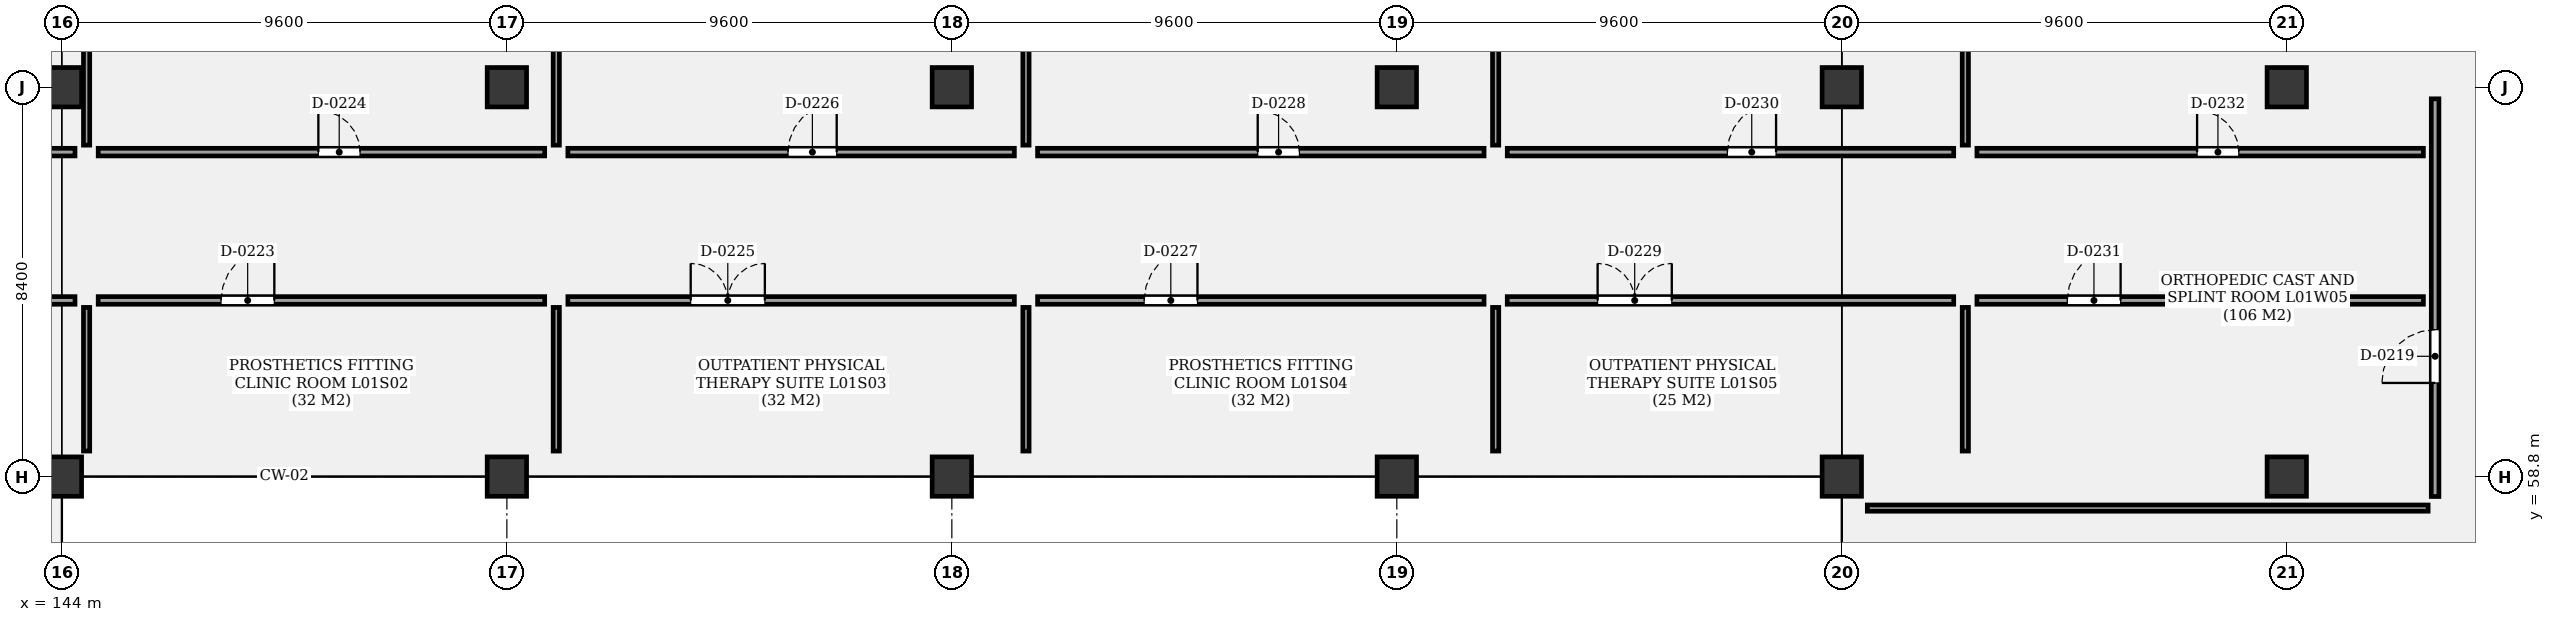
"""IFC4 building model, lengths in metres.
Left out: names, types, materials, properties, quantities, classifications, styles, units other than length and angle.
Written with IfcOpenShell. Run it as: python <this file> out.ifc"""

import sys

from ifc_helpers import new_model, si_unit, direction, frame, frame_2d, origin, origin_2d, place, context, subcontext, project, spatial, rectangle, extrude, element, fill, save


model = new_model("IFC4")
c1 = context("Model", 3, precision=1e-05, world=origin(), true_north=direction((0.0, 1.0)))
c2 = subcontext(c1, "Body", "Model", "MODEL_VIEW")
j1 = project(units=[si_unit("LENGTHUNIT", "METRE"), si_unit("PLANEANGLEUNIT", "RADIAN")], contexts=[c1])
p1 = place(None, origin())
s1 = spatial("IfcSite", under=j1, at=p1, CompositionType="ELEMENT")
p2 = place(p1, origin())
s2 = spatial("IfcBuilding", under=s1, at=p2, CompositionType="ELEMENT")
p3 = place(p2, frame((0.0, 0.0, 5.1)))
s3 = spatial("IfcBuildingStorey", under=s2, at=p3, CompositionType="ELEMENT", Elevation=5.1)
for number, where, z_axis, x_axis in (
    (1, (144.0, 58.8, 0.0), (0.0, 0.0, 1.0), (1.0, 0.0, 0.0)),
    (2, (144.0, 67.2, 0.0), (0.0, 0.0, 1.0), (1.0, 0.0, 0.0)),
    (3, (153.6, 58.8, 0.0), (0.0, 0.0, 1.0), (1.0, 0.0, 0.0)),
    (4, (153.6, 67.2, 0.0), (0.0, 0.0, 1.0), (1.0, 0.0, 0.0)),
    (5, (163.2, 58.8, 0.0), (0.0, 0.0, 1.0), (1.0, 0.0, 0.0)),
    (6, (163.2, 67.2, 0.0), (0.0, 0.0, 1.0), (1.0, 0.0, 0.0)),
    (7, (172.8, 58.8, 0.0), (0.0, 0.0, 1.0), (1.0, 0.0, 0.0)),
    (8, (172.8, 67.2, 0.0), (0.0, 0.0, 1.0), (1.0, 0.0, 0.0)),
    (9, (182.4, 58.8, 0.0), (0.0, 0.0, 1.0), (1.0, 0.0, 0.0)),
    (10, (182.4, 67.2, 0.0), (0.0, 0.0, 1.0), (1.0, 0.0, 0.0)),
    (11, (192.0, 58.8, 0.0), (0.0, 0.0, 1.0), (1.0, 0.0, 0.0)),
    (12, (192.0, 67.2, 0.0), (0.0, 0.0, 1.0), (1.0, 0.0, 0.0)),
):
    element("IfcColumn", number, at=place(p3, frame(where, z_axis=z_axis, x_axis=x_axis)), inside=s3, PredefinedType="COLUMN", context=c2, shape_type="SweptSolid", body=[
        extrude(rectangle(XDim=0.85, YDim=0.85, at=origin_2d()), origin(), (0.0, 0.0, 1.0), 4.8),
    ])
p4 = place(p3, frame((195.2, 58.37, 0.0), z_axis=(0.0, 0.0, 1.0), x_axis=(0.0, 1.0, 0.0)))
e13 = element("IfcWall", 13, at=p4, inside=s3, PredefinedType="PARTITIONING", context=c2, shape_type="SweptSolid", body=[
    extrude(rectangle(XDim=8.58, YDim=0.165, at=frame_2d((4.29, 0.0))), origin(), (0.0, 0.0, 1.0), 3.68),
])
p5 = place(p4, frame((2.45, 0.0, 0.0)))
e14 = element("IfcOpeningElement", 14, at=p5, cuts=e13, PredefinedType="OPENING", context=c2, shape_type="SweptSolid", body=[
    extrude(rectangle(XDim=1.15, YDim=2.2, at=frame_2d((0.575, 1.1))), frame((0.0, 0.093, 0.0), z_axis=(0.0, -1.0, 0.0), x_axis=(1.0, 0.0, 0.0)), (0.0, 0.0, 1.0), 0.185),
])
p6 = place(p3, frame((182.95, 58.12, 0.0), z_axis=(0.0, 0.0, 1.0), x_axis=(1.0, 0.0, 0.0)))
e15 = element("IfcWall", 15, at=p6, inside=s3, PredefinedType="PARTITIONING", context=c2, shape_type="SweptSolid", body=[
    extrude(rectangle(XDim=12.1, YDim=0.135, at=frame_2d((6.05, 0.0))), origin(), (0.0, 0.0, 1.0), 3.68),
])
p7 = place(p3, frame((134.65, 62.6, 0.0), z_axis=(0.0, 0.0, 1.0), x_axis=(1.0, 0.0, 0.0)))
e16 = element("IfcWall", 16, at=p7, inside=s3, PredefinedType="PARTITIONING", context=c2, shape_type="SweptSolid", body=[
    extrude(rectangle(XDim=9.633, YDim=0.165, at=frame_2d((4.816, 0.0))), origin(), (0.0, 0.0, 1.0), 3.68),
])
p8 = place(p7, frame((2.65, 0.0, 0.0)))
e17 = element("IfcOpeningElement", 17, at=p8, cuts=e16, PredefinedType="OPENING", context=c2, shape_type="SweptSolid", body=[
    extrude(rectangle(XDim=1.6, YDim=2.2, at=frame_2d((0.8, 1.1))), frame((0.0, 0.093, 0.0), z_axis=(0.0, -1.0, 0.0), x_axis=(1.0, 0.0, 0.0)), (0.0, 0.0, 1.0), 0.185),
])
p9 = place(p3, frame((134.65, 65.8, 0.0), z_axis=(0.0, 0.0, 1.0), x_axis=(1.0, 0.0, 0.0)))
e18 = element("IfcWall", 18, at=p9, inside=s3, PredefinedType="PARTITIONING", context=c2, shape_type="SweptSolid", body=[
    extrude(rectangle(XDim=9.633, YDim=0.165, at=frame_2d((4.816, 0.0))), origin(), (0.0, 0.0, 1.0), 3.68),
])
p10 = place(p9, frame((4.75, 0.0, 0.0)))
e19 = element("IfcOpeningElement", 19, at=p10, cuts=e18, PredefinedType="OPENING", context=c2, shape_type="SweptSolid", body=[
    extrude(rectangle(XDim=1.05, YDim=2.1, at=frame_2d((0.525, 1.05))), frame((0.0, 0.093, 0.0), z_axis=(0.0, -1.0, 0.0), x_axis=(1.0, 0.0, 0.0)), (0.0, 0.0, 1.0), 0.185),
])
p11 = place(p3, frame((144.783, 62.6, 0.0), z_axis=(0.0, 0.0, 1.0), x_axis=(1.0, 0.0, 0.0)))
e20 = element("IfcWall", 20, at=p11, inside=s3, PredefinedType="PARTITIONING", context=c2, shape_type="SweptSolid", body=[
    extrude(rectangle(XDim=9.633, YDim=0.165, at=frame_2d((4.816, 0.0))), origin(), (0.0, 0.0, 1.0), 3.68),
])
p12 = place(p11, frame((2.65, 0.0, 0.0)))
e21 = element("IfcOpeningElement", 21, at=p12, cuts=e20, PredefinedType="OPENING", context=c2, shape_type="SweptSolid", body=[
    extrude(rectangle(XDim=1.15, YDim=2.2, at=frame_2d((0.575, 1.1))), frame((0.0, 0.093, 0.0), z_axis=(0.0, -1.0, 0.0), x_axis=(1.0, 0.0, 0.0)), (0.0, 0.0, 1.0), 0.185),
])
p13 = place(p3, frame((144.533, 59.35, 0.0), z_axis=(0.0, 0.0, 1.0), x_axis=(0.0, 1.0, 0.0)))
e22 = element("IfcWall", 22, at=p13, inside=s3, PredefinedType="PARTITIONING", context=c2, shape_type="SweptSolid", body=[
    extrude(rectangle(XDim=3.1, YDim=0.135, at=frame_2d((1.55, 0.0))), origin(), (0.0, 0.0, 1.0), 3.68),
])
p14 = place(p3, frame((144.783, 65.8, 0.0), z_axis=(0.0, 0.0, 1.0), x_axis=(1.0, 0.0, 0.0)))
e23 = element("IfcWall", 23, at=p14, inside=s3, PredefinedType="PARTITIONING", context=c2, shape_type="SweptSolid", body=[
    extrude(rectangle(XDim=9.633, YDim=0.165, at=frame_2d((4.816, 0.0))), origin(), (0.0, 0.0, 1.0), 3.68),
])
p15 = place(p14, frame((4.75, 0.0, 0.0)))
e24 = element("IfcOpeningElement", 24, at=p15, cuts=e23, PredefinedType="OPENING", context=c2, shape_type="SweptSolid", body=[
    extrude(rectangle(XDim=0.9, YDim=2.1, at=frame_2d((0.45, 1.05))), frame((0.0, 0.093, 0.0), z_axis=(0.0, -1.0, 0.0), x_axis=(1.0, 0.0, 0.0)), (0.0, 0.0, 1.0), 0.185),
])
p16 = place(p3, frame((144.533, 65.95, 0.0), z_axis=(0.0, 0.0, 1.0), x_axis=(0.0, 1.0, 0.0)))
e25 = element("IfcWall", 25, at=p16, inside=s3, PredefinedType="PARTITIONING", context=c2, shape_type="SweptSolid", body=[
    extrude(rectangle(XDim=9.1, YDim=0.135, at=frame_2d((4.55, 0.0))), origin(), (0.0, 0.0, 1.0), 3.68),
])
p17 = place(p3, frame((154.916, 62.6, 0.0), z_axis=(0.0, 0.0, 1.0), x_axis=(1.0, 0.0, 0.0)))
e26 = element("IfcWall", 26, at=p17, inside=s3, PredefinedType="PARTITIONING", context=c2, shape_type="SweptSolid", body=[
    extrude(rectangle(XDim=9.633, YDim=0.165, at=frame_2d((4.816, 0.0))), origin(), (0.0, 0.0, 1.0), 3.68),
])
p18 = place(p17, frame((2.65, 0.0, 0.0)))
e27 = element("IfcOpeningElement", 27, at=p18, cuts=e26, PredefinedType="OPENING", context=c2, shape_type="SweptSolid", body=[
    extrude(rectangle(XDim=1.6, YDim=2.2, at=frame_2d((0.8, 1.1))), frame((0.0, 0.093, 0.0), z_axis=(0.0, -1.0, 0.0), x_axis=(1.0, 0.0, 0.0)), (0.0, 0.0, 1.0), 0.185),
])
p19 = place(p3, frame((154.666, 59.35, 0.0), z_axis=(0.0, 0.0, 1.0), x_axis=(0.0, 1.0, 0.0)))
e28 = element("IfcWall", 28, at=p19, inside=s3, PredefinedType="PARTITIONING", context=c2, shape_type="SweptSolid", body=[
    extrude(rectangle(XDim=3.1, YDim=0.135, at=frame_2d((1.55, 0.0))), origin(), (0.0, 0.0, 1.0), 3.68),
])
p20 = place(p3, frame((154.916, 65.8, 0.0), z_axis=(0.0, 0.0, 1.0), x_axis=(1.0, 0.0, 0.0)))
e29 = element("IfcWall", 29, at=p20, inside=s3, PredefinedType="PARTITIONING", context=c2, shape_type="SweptSolid", body=[
    extrude(rectangle(XDim=9.633, YDim=0.165, at=frame_2d((4.816, 0.0))), origin(), (0.0, 0.0, 1.0), 3.68),
])
p21 = place(p20, frame((4.75, 0.0, 0.0)))
e30 = element("IfcOpeningElement", 30, at=p21, cuts=e29, PredefinedType="OPENING", context=c2, shape_type="SweptSolid", body=[
    extrude(rectangle(XDim=1.05, YDim=2.1, at=frame_2d((0.525, 1.05))), frame((0.0, 0.093, 0.0), z_axis=(0.0, -1.0, 0.0), x_axis=(1.0, 0.0, 0.0)), (0.0, 0.0, 1.0), 0.185),
])
p22 = place(p3, frame((154.666, 65.95, 0.0), z_axis=(0.0, 0.0, 1.0), x_axis=(0.0, 1.0, 0.0)))
e31 = element("IfcWall", 31, at=p22, inside=s3, PredefinedType="PARTITIONING", context=c2, shape_type="SweptSolid", body=[
    extrude(rectangle(XDim=9.1, YDim=0.135, at=frame_2d((4.55, 0.0))), origin(), (0.0, 0.0, 1.0), 3.68),
])
p23 = place(p3, frame((165.049, 62.6, 0.0), z_axis=(0.0, 0.0, 1.0), x_axis=(1.0, 0.0, 0.0)))
e32 = element("IfcWall", 32, at=p23, inside=s3, PredefinedType="PARTITIONING", context=c2, shape_type="SweptSolid", body=[
    extrude(rectangle(XDim=9.633, YDim=0.165, at=frame_2d((4.816, 0.0))), origin(), (0.0, 0.0, 1.0), 3.68),
])
p24 = place(p23, frame((2.3, 0.0, 0.0)))
e33 = element("IfcOpeningElement", 33, at=p24, cuts=e32, PredefinedType="OPENING", context=c2, shape_type="SweptSolid", body=[
    extrude(rectangle(XDim=1.15, YDim=2.2, at=frame_2d((0.575, 1.1))), frame((0.0, 0.093, 0.0), z_axis=(0.0, -1.0, 0.0), x_axis=(1.0, 0.0, 0.0)), (0.0, 0.0, 1.0), 0.185),
])
p25 = place(p3, frame((164.799, 59.35, 0.0), z_axis=(0.0, 0.0, 1.0), x_axis=(0.0, 1.0, 0.0)))
e34 = element("IfcWall", 34, at=p25, inside=s3, PredefinedType="PARTITIONING", context=c2, shape_type="SweptSolid", body=[
    extrude(rectangle(XDim=3.1, YDim=0.135, at=frame_2d((1.55, 0.0))), origin(), (0.0, 0.0, 1.0), 3.68),
])
p26 = place(p3, frame((165.049, 65.8, 0.0), z_axis=(0.0, 0.0, 1.0), x_axis=(1.0, 0.0, 0.0)))
e35 = element("IfcWall", 35, at=p26, inside=s3, PredefinedType="PARTITIONING", context=c2, shape_type="SweptSolid", body=[
    extrude(rectangle(XDim=9.633, YDim=0.165, at=frame_2d((4.816, 0.0))), origin(), (0.0, 0.0, 1.0), 3.68),
])
p27 = place(p26, frame((4.75, 0.0, 0.0)))
e36 = element("IfcOpeningElement", 36, at=p27, cuts=e35, PredefinedType="OPENING", context=c2, shape_type="SweptSolid", body=[
    extrude(rectangle(XDim=0.9, YDim=2.1, at=frame_2d((0.45, 1.05))), frame((0.0, 0.093, 0.0), z_axis=(0.0, -1.0, 0.0), x_axis=(1.0, 0.0, 0.0)), (0.0, 0.0, 1.0), 0.185),
])
p28 = place(p3, frame((164.799, 65.95, 0.0), z_axis=(0.0, 0.0, 1.0), x_axis=(0.0, 1.0, 0.0)))
e37 = element("IfcWall", 37, at=p28, inside=s3, PredefinedType="PARTITIONING", context=c2, shape_type="SweptSolid", body=[
    extrude(rectangle(XDim=9.1, YDim=0.135, at=frame_2d((4.55, 0.0))), origin(), (0.0, 0.0, 1.0), 3.68),
])
p29 = place(p3, frame((175.182, 62.6, 0.0), z_axis=(0.0, 0.0, 1.0), x_axis=(1.0, 0.0, 0.0)))
e38 = element("IfcWall", 38, at=p29, inside=s3, PredefinedType="PARTITIONING", context=c2, shape_type="SweptSolid", body=[
    extrude(rectangle(XDim=9.633, YDim=0.165, at=frame_2d((4.816, 0.0))), origin(), (0.0, 0.0, 1.0), 3.68),
])
p30 = place(p29, frame((1.95, 0.0, 0.0)))
e39 = element("IfcOpeningElement", 39, at=p30, cuts=e38, PredefinedType="OPENING", context=c2, shape_type="SweptSolid", body=[
    extrude(rectangle(XDim=1.6, YDim=2.2, at=frame_2d((0.8, 1.1))), frame((0.0, 0.093, 0.0), z_axis=(0.0, -1.0, 0.0), x_axis=(1.0, 0.0, 0.0)), (0.0, 0.0, 1.0), 0.185),
])
p31 = place(p3, frame((174.932, 59.35, 0.0), z_axis=(0.0, 0.0, 1.0), x_axis=(0.0, 1.0, 0.0)))
e40 = element("IfcWall", 40, at=p31, inside=s3, PredefinedType="PARTITIONING", context=c2, shape_type="SweptSolid", body=[
    extrude(rectangle(XDim=3.1, YDim=0.135, at=frame_2d((1.55, 0.0))), origin(), (0.0, 0.0, 1.0), 3.68),
])
p32 = place(p3, frame((175.182, 65.8, 0.0), z_axis=(0.0, 0.0, 1.0), x_axis=(1.0, 0.0, 0.0)))
e41 = element("IfcWall", 41, at=p32, inside=s3, PredefinedType="PARTITIONING", context=c2, shape_type="SweptSolid", body=[
    extrude(rectangle(XDim=9.633, YDim=0.165, at=frame_2d((4.816, 0.0))), origin(), (0.0, 0.0, 1.0), 3.68),
])
p33 = place(p32, frame((4.75, 0.0, 0.0)))
e42 = element("IfcOpeningElement", 42, at=p33, cuts=e41, PredefinedType="OPENING", context=c2, shape_type="SweptSolid", body=[
    extrude(rectangle(XDim=1.05, YDim=2.1, at=frame_2d((0.525, 1.05))), frame((0.0, 0.093, 0.0), z_axis=(0.0, -1.0, 0.0), x_axis=(1.0, 0.0, 0.0)), (0.0, 0.0, 1.0), 0.185),
])
p34 = place(p3, frame((174.932, 65.95, 0.0), z_axis=(0.0, 0.0, 1.0), x_axis=(0.0, 1.0, 0.0)))
e43 = element("IfcWall", 43, at=p34, inside=s3, PredefinedType="PARTITIONING", context=c2, shape_type="SweptSolid", body=[
    extrude(rectangle(XDim=9.1, YDim=0.135, at=frame_2d((4.55, 0.0))), origin(), (0.0, 0.0, 1.0), 3.68),
])
p35 = place(p3, frame((185.315, 62.6, 0.0), z_axis=(0.0, 0.0, 1.0), x_axis=(1.0, 0.0, 0.0)))
e44 = element("IfcWall", 44, at=p35, inside=s3, PredefinedType="PARTITIONING", context=c2, shape_type="SweptSolid", body=[
    extrude(rectangle(XDim=9.633, YDim=0.165, at=frame_2d((4.816, 0.0))), origin(), (0.0, 0.0, 1.0), 3.68),
])
p36 = place(p35, frame((1.95, 0.0, 0.0)))
e45 = element("IfcOpeningElement", 45, at=p36, cuts=e44, PredefinedType="OPENING", context=c2, shape_type="SweptSolid", body=[
    extrude(rectangle(XDim=1.15, YDim=2.2, at=frame_2d((0.575, 1.1))), frame((0.0, 0.093, 0.0), z_axis=(0.0, -1.0, 0.0), x_axis=(1.0, 0.0, 0.0)), (0.0, 0.0, 1.0), 0.185),
])
p37 = place(p3, frame((185.065, 59.35, 0.0), z_axis=(0.0, 0.0, 1.0), x_axis=(0.0, 1.0, 0.0)))
e46 = element("IfcWall", 46, at=p37, inside=s3, PredefinedType="PARTITIONING", context=c2, shape_type="SweptSolid", body=[
    extrude(rectangle(XDim=3.1, YDim=0.135, at=frame_2d((1.55, 0.0))), origin(), (0.0, 0.0, 1.0), 3.68),
])
p38 = place(p3, frame((185.315, 65.8, 0.0), z_axis=(0.0, 0.0, 1.0), x_axis=(1.0, 0.0, 0.0)))
e47 = element("IfcWall", 47, at=p38, inside=s3, PredefinedType="PARTITIONING", context=c2, shape_type="SweptSolid", body=[
    extrude(rectangle(XDim=9.633, YDim=0.165, at=frame_2d((4.816, 0.0))), origin(), (0.0, 0.0, 1.0), 3.68),
])
p39 = place(p38, frame((4.75, 0.0, 0.0)))
e48 = element("IfcOpeningElement", 48, at=p39, cuts=e47, PredefinedType="OPENING", context=c2, shape_type="SweptSolid", body=[
    extrude(rectangle(XDim=0.9, YDim=2.1, at=frame_2d((0.45, 1.05))), frame((0.0, 0.093, 0.0), z_axis=(0.0, -1.0, 0.0), x_axis=(1.0, 0.0, 0.0)), (0.0, 0.0, 1.0), 0.185),
])
p40 = place(p3, frame((185.065, 65.95, 0.0), z_axis=(0.0, 0.0, 1.0), x_axis=(0.0, 1.0, 0.0)))
e49 = element("IfcWall", 49, at=p40, inside=s3, PredefinedType="PARTITIONING", context=c2, shape_type="SweptSolid", body=[
    extrude(rectangle(XDim=9.1, YDim=0.135, at=frame_2d((4.55, 0.0))), origin(), (0.0, 0.0, 1.0), 3.68),
])
p41 = place(p5, origin())
e50 = element("IfcDoor", 50, at=p41, inside=s3, OperationType="SINGLE_SWING_LEFT", PredefinedType="DOOR", context=c2, shape_type="SweptSolid", body=[
    extrude(rectangle(XDim=1.15, YDim=2.2, at=frame_2d((0.575, 1.1))), frame((0.0, 0.025, 0.0), z_axis=(0.0, -1.0, 0.0), x_axis=(1.0, 0.0, 0.0)), (0.0, 0.0, 1.0), 0.05),
])
fill(e14, e50)
p42 = place(p12, origin())
e51 = element("IfcDoor", 51, at=p42, inside=s3, OperationType="SINGLE_SWING_RIGHT", PredefinedType="DOOR", context=c2, shape_type="SweptSolid", body=[
    extrude(rectangle(XDim=1.15, YDim=2.2, at=frame_2d((0.575, 1.1))), frame((0.0, 0.025, 0.0), z_axis=(0.0, -1.0, 0.0), x_axis=(1.0, 0.0, 0.0)), (0.0, 0.0, 1.0), 0.05),
])
fill(e21, e51)
p43 = place(p15, origin())
e52 = element("IfcDoor", 52, at=p43, inside=s3, OperationType="SINGLE_SWING_LEFT", PredefinedType="DOOR", context=c2, shape_type="SweptSolid", body=[
    extrude(rectangle(XDim=0.9, YDim=2.1, at=frame_2d((0.45, 1.05))), frame((0.0, 0.025, 0.0), z_axis=(0.0, -1.0, 0.0), x_axis=(1.0, 0.0, 0.0)), (0.0, 0.0, 1.0), 0.05),
])
fill(e24, e52)
p44 = place(p18, origin())
e53 = element("IfcDoor", 53, at=p44, inside=s3, OperationType="DOUBLE_DOOR_SINGLE_SWING", PredefinedType="DOOR", context=c2, shape_type="SweptSolid", body=[
    extrude(rectangle(XDim=1.6, YDim=2.2, at=frame_2d((0.8, 1.1))), frame((0.0, 0.025, 0.0), z_axis=(0.0, -1.0, 0.0), x_axis=(1.0, 0.0, 0.0)), (0.0, 0.0, 1.0), 0.05),
])
fill(e27, e53)
p45 = place(p21, origin())
e54 = element("IfcDoor", 54, at=p45, inside=s3, OperationType="SINGLE_SWING_RIGHT", PredefinedType="DOOR", context=c2, shape_type="SweptSolid", body=[
    extrude(rectangle(XDim=1.05, YDim=2.1, at=frame_2d((0.525, 1.05))), frame((0.0, 0.025, 0.0), z_axis=(0.0, -1.0, 0.0), x_axis=(1.0, 0.0, 0.0)), (0.0, 0.0, 1.0), 0.05),
])
fill(e30, e54)
p46 = place(p24, origin())
e55 = element("IfcDoor", 55, at=p46, inside=s3, OperationType="SINGLE_SWING_RIGHT", PredefinedType="DOOR", context=c2, shape_type="SweptSolid", body=[
    extrude(rectangle(XDim=1.15, YDim=2.2, at=frame_2d((0.575, 1.1))), frame((0.0, 0.025, 0.0), z_axis=(0.0, -1.0, 0.0), x_axis=(1.0, 0.0, 0.0)), (0.0, 0.0, 1.0), 0.05),
])
fill(e33, e55)
p47 = place(p27, origin())
e56 = element("IfcDoor", 56, at=p47, inside=s3, OperationType="SINGLE_SWING_LEFT", PredefinedType="DOOR", context=c2, shape_type="SweptSolid", body=[
    extrude(rectangle(XDim=0.9, YDim=2.1, at=frame_2d((0.45, 1.05))), frame((0.0, 0.025, 0.0), z_axis=(0.0, -1.0, 0.0), x_axis=(1.0, 0.0, 0.0)), (0.0, 0.0, 1.0), 0.05),
])
fill(e36, e56)
p48 = place(p30, origin())
e57 = element("IfcDoor", 57, at=p48, inside=s3, OperationType="DOUBLE_DOOR_SINGLE_SWING", PredefinedType="DOOR", context=c2, shape_type="SweptSolid", body=[
    extrude(rectangle(XDim=1.6, YDim=2.2, at=frame_2d((0.8, 1.1))), frame((0.0, 0.025, 0.0), z_axis=(0.0, -1.0, 0.0), x_axis=(1.0, 0.0, 0.0)), (0.0, 0.0, 1.0), 0.05),
])
fill(e39, e57)
p49 = place(p33, origin())
e58 = element("IfcDoor", 58, at=p49, inside=s3, OperationType="SINGLE_SWING_RIGHT", PredefinedType="DOOR", context=c2, shape_type="SweptSolid", body=[
    extrude(rectangle(XDim=1.05, YDim=2.1, at=frame_2d((0.525, 1.05))), frame((0.0, 0.025, 0.0), z_axis=(0.0, -1.0, 0.0), x_axis=(1.0, 0.0, 0.0)), (0.0, 0.0, 1.0), 0.05),
])
fill(e42, e58)
p50 = place(p36, origin())
e59 = element("IfcDoor", 59, at=p50, inside=s3, OperationType="SINGLE_SWING_RIGHT", PredefinedType="DOOR", context=c2, shape_type="SweptSolid", body=[
    extrude(rectangle(XDim=1.15, YDim=2.2, at=frame_2d((0.575, 1.1))), frame((0.0, 0.025, 0.0), z_axis=(0.0, -1.0, 0.0), x_axis=(1.0, 0.0, 0.0)), (0.0, 0.0, 1.0), 0.05),
])
fill(e45, e59)
p51 = place(p39, origin())
e60 = element("IfcDoor", 60, at=p51, inside=s3, OperationType="SINGLE_SWING_LEFT", PredefinedType="DOOR", context=c2, shape_type="SweptSolid", body=[
    extrude(rectangle(XDim=0.9, YDim=2.1, at=frame_2d((0.45, 1.05))), frame((0.0, 0.025, 0.0), z_axis=(0.0, -1.0, 0.0), x_axis=(1.0, 0.0, 0.0)), (0.0, 0.0, 1.0), 0.05),
])
fill(e48, e60)
save(model, sys.argv[1])
